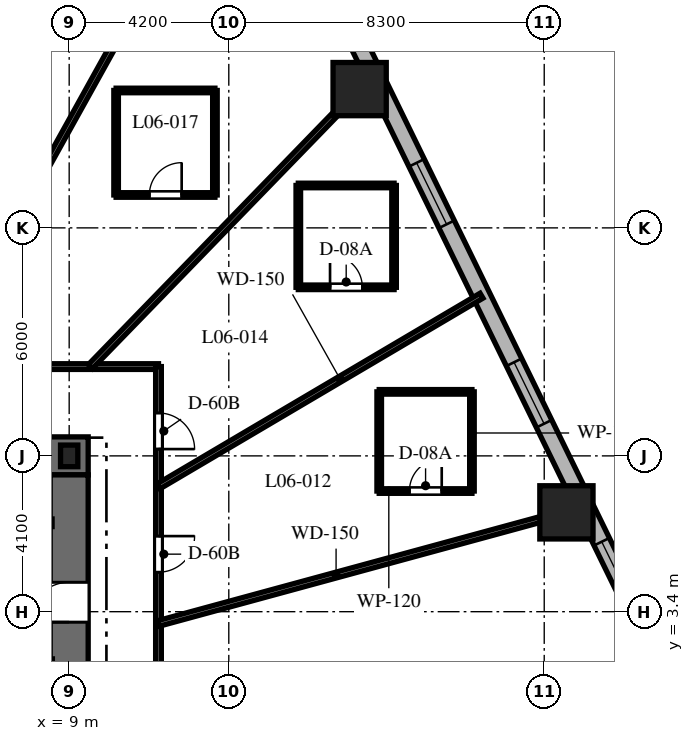
"""IFC4 building model, lengths in metres.
Left out: names, types, materials, properties, quantities, classifications, styles, units other than length and angle.
Written with IfcOpenShell. Run it as: python <this file> out.ifc"""

import sys

from ifc_helpers import new_model, si_unit, direction, frame, frame_2d, origin, origin_2d, place, context, subcontext, project, spatial, rectangle, i_section, extrude, element, fill, save


model = new_model("IFC4")
c1 = context("Model", 3, precision=1e-05, world=origin(), true_north=direction((0.0, 1.0)))
c2 = subcontext(c1, "Body", "Model", "MODEL_VIEW")
j1 = project(units=[si_unit("LENGTHUNIT", "METRE"), si_unit("PLANEANGLEUNIT", "RADIAN")], contexts=[c1])
p1 = place(None, origin())
s1 = spatial("IfcSite", under=j1, at=p1, CompositionType="ELEMENT")
p2 = place(p1, origin())
s2 = spatial("IfcBuilding", under=s1, at=p2, CompositionType="ELEMENT")
p3 = place(p2, frame((0.0, 0.0, 34.2)))
s3 = spatial("IfcBuildingStorey", under=s2, at=p3, CompositionType="ELEMENT", Elevation=34.2)
p4 = place(p3, frame((1.85, 7.5, 0.0), z_axis=(0.0, 0.0, 1.0), x_axis=(1.0, 0.0, 0.0)))
e1 = element("IfcWall", 1, at=p4, inside=s3, PredefinedType="SHEAR", context=c2, shape_type="SweptSolid", body=[
    extrude(rectangle(XDim=7.65, YDim=1.0, at=frame_2d((3.825, 0.0))), origin(), (0.0, 0.0, 1.0), 3.7),
])
p5 = place(p3, frame((9.0, -7.0, 0.0), z_axis=(0.0, 0.0, 1.0), x_axis=(0.0, 1.0, 0.0)))
e2 = element("IfcWall", 2, at=p5, inside=s3, PredefinedType="SHEAR", context=c2, shape_type="SweptSolid", body=[
    extrude(rectangle(XDim=14.0, YDim=1.0, at=frame_2d((7.0, 0.0))), origin(), (0.0, 0.0, 1.0), 3.7),
])
p6 = place(p5, frame((10.125, 0.0, 0.0)))
e3 = element("IfcOpeningElement", 3, at=p6, cuts=e2, PredefinedType="OPENING", context=c2, shape_type="SweptSolid", body=[
    extrude(rectangle(XDim=1.05, YDim=2.15, at=frame_2d((0.525, 1.075))), frame((0.0, 0.51, 0.0), z_axis=(0.0, -1.0, 0.0), x_axis=(1.0, 0.0, 0.0)), (0.0, 0.0, 1.0), 1.02),
])
p7 = place(p3, frame((8.458, -6.985, 0.0), z_axis=(0.0, 0.0, 1.0), x_axis=(0.0, 1.0, 0.0)))
e4 = element("IfcWall", 4, at=p7, inside=s3, PredefinedType="SHEAR", context=c2, shape_type="SweptSolid", body=[
    extrude(rectangle(XDim=9.143, YDim=0.2, at=frame_2d((4.572, 0.0))), origin(), (0.0, 0.0, 1.0), 3.7),
])
p8 = place(p3, frame((9.0, 7.5, 0.0), z_axis=(0.0, 0.0, 1.0), x_axis=(1.0, 0.0, 0.0)))
e5 = element("IfcColumn", 5, at=p8, inside=s3, PredefinedType="COLUMN", context=c2, shape_type="SweptSolid", body=[
    extrude(i_section(OverallWidth=0.454, OverallDepth=0.569, WebThickness=0.078, FlangeThickness=0.125, at=origin_2d()), origin(), (0.0, 0.0, 1.0), 3.7),
])
for number, where, z_axis, x_axis in (
    (6, (22.084, 6.014, 0.0), (0.0, 0.0, 1.0), (1.0, 0.0, 0.0)),
    (7, (16.643, 17.152, 0.0), (0.0, 0.0, 1.0), (1.0, 0.0, 0.0)),
):
    element("IfcColumn", number, at=place(p3, frame(where, z_axis=z_axis, x_axis=x_axis)), inside=s3, PredefinedType="COLUMN", context=c2, shape_type="SweptSolid", body=[
        extrude(rectangle(XDim=1.4, YDim=1.4, at=origin_2d()), origin(), (0.0, 0.0, 1.0), 3.7),
    ])
p9 = place(p3, frame((24.336, 2.532, 0.0), z_axis=(0.0, 0.0, 1.0), x_axis=(-0.438931326393, 0.898520612291, 0.0)))
e8 = element("IfcWall", 8, at=p9, inside=s3, PredefinedType="SOLIDWALL", context=c2, shape_type="SweptSolid", body=[
    extrude(rectangle(XDim=20.623, YDim=0.45, at=frame_2d((10.312, 0.0))), origin(), (0.0, 0.0, 1.0), 3.4),
])
p10 = place(p9, frame((6.47, 0.0, 0.8)))
e9 = element("IfcOpeningElement", 9, at=p10, cuts=e8, PredefinedType="OPENING", context=c2, shape_type="SweptSolid", body=[
    extrude(rectangle(XDim=1.8, YDim=1.8, at=frame_2d((0.9, 0.9))), frame((0.0, 0.235, 0.0), z_axis=(0.0, -1.0, 0.0), x_axis=(1.0, 0.0, 0.0)), (0.0, 0.0, 1.0), 0.47),
])
p11 = place(p9, frame((12.311, 0.0, 0.8)))
e10 = element("IfcOpeningElement", 10, at=p11, cuts=e8, PredefinedType="OPENING", context=c2, shape_type="SweptSolid", body=[
    extrude(rectangle(XDim=1.8, YDim=1.8, at=frame_2d((0.9, 0.9))), frame((0.0, 0.235, 0.0), z_axis=(0.0, -1.0, 0.0), x_axis=(1.0, 0.0, 0.0)), (0.0, 0.0, 1.0), 0.47),
])
p12 = place(p9, frame((17.66, 0.0, 0.8)))
e11 = element("IfcOpeningElement", 11, at=p12, cuts=e8, PredefinedType="OPENING", context=c2, shape_type="SweptSolid", body=[
    extrude(rectangle(XDim=1.8, YDim=1.8, at=frame_2d((0.9, 0.9))), frame((0.0, 0.235, 0.0), z_axis=(0.0, -1.0, 0.0), x_axis=(1.0, 0.0, 0.0)), (0.0, 0.0, 1.0), 0.47),
])
p13 = place(p9, frame((1.214, 0.0, 0.8)))
e12 = element("IfcOpeningElement", 12, at=p13, cuts=e8, PredefinedType="OPENING", context=c2, shape_type="SweptSolid", body=[
    extrude(rectangle(XDim=1.8, YDim=1.8, at=frame_2d((0.9, 0.9))), frame((0.0, 0.235, 0.0), z_axis=(0.0, -1.0, 0.0), x_axis=(1.0, 0.0, 0.0)), (0.0, 0.0, 1.0), 0.47),
])
p14 = place(p3, frame((-11.35, 9.85, 0.0), z_axis=(0.0, 0.0, 1.0), x_axis=(1.0, 0.0, 0.0)))
e13 = element("IfcWall", 13, at=p14, inside=s3, PredefinedType="PARTITIONING", context=c2, shape_type="SweptSolid", body=[
    extrude(rectangle(XDim=22.7, YDim=0.15, at=frame_2d((11.35, 0.0))), origin(), (0.0, 0.0, 1.0), 2.84),
])
p15 = place(p14, frame((18.436, 0.0, 0.0)))
e14 = element("IfcOpeningElement", 14, at=p15, cuts=e13, PredefinedType="OPENING", context=c2, shape_type="SweptSolid", body=[
    extrude(rectangle(XDim=0.95, YDim=2.03, at=frame_2d((0.475, 1.015))), frame((0.0, 0.085, 0.0), z_axis=(0.0, -1.0, 0.0), x_axis=(1.0, 0.0, 0.0)), (0.0, 0.0, 1.0), 0.17),
])
p16 = place(p14, frame((15.176, 0.0, 0.0)))
e15 = element("IfcOpeningElement", 15, at=p16, cuts=e13, PredefinedType="OPENING", context=c2, shape_type="SweptSolid", body=[
    extrude(rectangle(XDim=0.9, YDim=2.03, at=frame_2d((0.45, 1.015))), frame((0.0, 0.085, 0.0), z_axis=(0.0, -1.0, 0.0), x_axis=(1.0, 0.0, 0.0)), (0.0, 0.0, 1.0), 0.17),
])
p17 = place(p14, frame((12.415, 0.0, 0.0)))
e16 = element("IfcOpeningElement", 16, at=p17, cuts=e13, PredefinedType="OPENING", context=c2, shape_type="SweptSolid", body=[
    extrude(rectangle(XDim=0.95, YDim=2.03, at=frame_2d((0.475, 1.015))), frame((0.0, 0.085, 0.0), z_axis=(0.0, -1.0, 0.0), x_axis=(1.0, 0.0, 0.0)), (0.0, 0.0, 1.0), 0.17),
])
p18 = place(p14, frame((8.925, 0.0, 0.0)))
e17 = element("IfcOpeningElement", 17, at=p18, cuts=e13, PredefinedType="OPENING", context=c2, shape_type="SweptSolid", body=[
    extrude(rectangle(XDim=0.95, YDim=2.03, at=frame_2d((0.475, 1.015))), frame((0.0, 0.085, 0.0), z_axis=(0.0, -1.0, 0.0), x_axis=(1.0, 0.0, 0.0)), (0.0, 0.0, 1.0), 0.17),
])
p19 = place(p14, frame((3.369, 0.0, 0.0)))
e18 = element("IfcOpeningElement", 18, at=p19, cuts=e13, PredefinedType="OPENING", context=c2, shape_type="SweptSolid", body=[
    extrude(rectangle(XDim=0.95, YDim=2.03, at=frame_2d((0.475, 1.015))), frame((0.0, 0.085, 0.0), z_axis=(0.0, -1.0, 0.0), x_axis=(1.0, 0.0, 0.0)), (0.0, 0.0, 1.0), 0.17),
])
p20 = place(p3, frame((11.35, 9.85, 0.0), z_axis=(0.0, 0.0, 1.0), x_axis=(0.0, -1.0, 0.0)))
e19 = element("IfcWall", 19, at=p20, inside=s3, PredefinedType="PARTITIONING", context=c2, shape_type="SweptSolid", body=[
    extrude(rectangle(XDim=19.7, YDim=0.15, at=frame_2d((9.85, 0.0))), origin(), (0.0, 0.0, 1.0), 2.84),
])
p21 = place(p20, frame((4.461, 0.0, 0.0)))
e20 = element("IfcOpeningElement", 20, at=p21, cuts=e19, PredefinedType="OPENING", context=c2, shape_type="SweptSolid", body=[
    extrude(rectangle(XDim=0.95, YDim=2.03, at=frame_2d((0.475, 1.015))), frame((0.0, 0.085, 0.0), z_axis=(0.0, -1.0, 0.0), x_axis=(1.0, 0.0, 0.0)), (0.0, 0.0, 1.0), 0.17),
])
p22 = place(p20, frame((1.221, 0.0, 0.0)))
e21 = element("IfcOpeningElement", 21, at=p22, cuts=e19, PredefinedType="OPENING", context=c2, shape_type="SweptSolid", body=[
    extrude(rectangle(XDim=0.95, YDim=2.03, at=frame_2d((0.475, 1.015))), frame((0.0, 0.085, 0.0), z_axis=(0.0, -1.0, 0.0), x_axis=(1.0, 0.0, 0.0)), (0.0, 0.0, 1.0), 0.17),
])
p23 = place(p20, frame((16.714, 0.0, 0.0)))
e22 = element("IfcOpeningElement", 22, at=p23, cuts=e19, PredefinedType="OPENING", context=c2, shape_type="SweptSolid", body=[
    extrude(rectangle(XDim=0.95, YDim=2.03, at=frame_2d((0.475, 1.015))), frame((0.0, 0.085, 0.0), z_axis=(0.0, -1.0, 0.0), x_axis=(1.0, 0.0, 0.0)), (0.0, 0.0, 1.0), 0.17),
])
p24 = place(p20, frame((12.932, 0.0, 0.0)))
e23 = element("IfcOpeningElement", 23, at=p24, cuts=e19, PredefinedType="OPENING", context=c2, shape_type="SweptSolid", body=[
    extrude(rectangle(XDim=0.95, YDim=2.03, at=frame_2d((0.475, 1.015))), frame((0.0, 0.085, 0.0), z_axis=(0.0, -1.0, 0.0), x_axis=(1.0, 0.0, 0.0)), (0.0, 0.0, 1.0), 0.17),
])
p25 = place(p20, frame((8.838, 0.0, 0.0)))
e24 = element("IfcOpeningElement", 24, at=p25, cuts=e19, PredefinedType="OPENING", context=c2, shape_type="SweptSolid", body=[
    extrude(rectangle(XDim=0.95, YDim=2.03, at=frame_2d((0.475, 1.015))), frame((0.0, 0.085, 0.0), z_axis=(0.0, -1.0, 0.0), x_axis=(1.0, 0.0, 0.0)), (0.0, 0.0, 1.0), 0.17),
])
p26 = place(p3, frame((11.35, 3.091, 0.0), z_axis=(0.0, 0.0, 1.0), x_axis=(0.964859685283, 0.262765651704, 0.0)))
e25 = element("IfcWall", 25, at=p26, inside=s3, PredefinedType="PARTITIONING", context=c2, shape_type="SweptSolid", body=[
    extrude(rectangle(XDim=11.629, YDim=0.15, at=frame_2d((5.814, 0.0))), origin(), (0.0, 0.0, 1.0), 2.54),
])
p27 = place(p3, frame((11.35, 6.698, 0.0), z_axis=(0.0, 0.0, 1.0), x_axis=(0.861198232886, 0.508269223614, 0.0)))
e26 = element("IfcWall", 26, at=p27, inside=s3, PredefinedType="PARTITIONING", context=c2, shape_type="SweptSolid", body=[
    extrude(rectangle(XDim=9.87, YDim=0.15, at=frame_2d((4.935, 0.0))), origin(), (0.0, 0.0, 1.0), 2.54),
])
p28 = place(p3, frame((9.558, 9.85, 0.0), z_axis=(0.0, 0.0, 1.0), x_axis=(0.69638346089, 0.717669893056, 0.0)))
e27 = element("IfcWall", 27, at=p28, inside=s3, PredefinedType="PARTITIONING", context=c2, shape_type="SweptSolid", body=[
    extrude(rectangle(XDim=10.701, YDim=0.15, at=frame_2d((5.351, 0.0))), origin(), (0.0, 0.0, 1.0), 2.54),
])
p29 = place(p3, frame((5.471, 9.85, 0.0), z_axis=(0.0, 0.0, 1.0), x_axis=(0.48553323157, 0.874218211341, 0.0)))
e28 = element("IfcWall", 28, at=p29, inside=s3, PredefinedType="PARTITIONING", context=c2, shape_type="SweptSolid", body=[
    extrude(rectangle(XDim=14.74, YDim=0.15, at=frame_2d((7.37, 0.0))), origin(), (0.0, 0.0, 1.0), 2.54),
])
p30 = place(p3, frame((17.158, 6.575, 0.0), z_axis=(0.0, 0.0, 1.0), x_axis=(1.0, 0.0, 0.0)))
e29 = element("IfcWall", 29, at=p30, inside=s3, PredefinedType="PARTITIONING", context=c2, shape_type="SweptSolid", body=[
    extrude(rectangle(XDim=2.44, YDim=0.12, at=frame_2d((1.22, 0.0))), origin(), (0.0, 0.0, 1.0), 2.84),
])
p31 = place(p30, frame((0.795, 0.0, 0.0)))
e30 = element("IfcOpeningElement", 30, at=p31, cuts=e29, PredefinedType="OPENING", context=c2, shape_type="SweptSolid", body=[
    extrude(rectangle(XDim=0.85, YDim=2.03, at=frame_2d((0.425, 1.015))), frame((0.0, 0.07, 0.0), z_axis=(0.0, -1.0, 0.0), x_axis=(1.0, 0.0, 0.0)), (0.0, 0.0, 1.0), 0.14),
])
p32 = place(p3, frame((19.598, 6.575, 0.0), z_axis=(0.0, 0.0, 1.0), x_axis=(0.0, 1.0, 0.0)))
e31 = element("IfcWall", 31, at=p32, inside=s3, PredefinedType="PARTITIONING", context=c2, shape_type="SweptSolid", body=[
    extrude(rectangle(XDim=2.61, YDim=0.12, at=frame_2d((1.305, 0.0))), origin(), (0.0, 0.0, 1.0), 3.4),
])
p33 = place(p3, frame((19.598, 9.185, 0.0), z_axis=(0.0, 0.0, 1.0), x_axis=(-1.0, 0.0, 0.0)))
e32 = element("IfcWall", 32, at=p33, inside=s3, PredefinedType="PARTITIONING", context=c2, shape_type="SweptSolid", body=[
    extrude(rectangle(XDim=2.44, YDim=0.12, at=frame_2d((1.22, 0.0))), origin(), (0.0, 0.0, 1.0), 3.4),
])
p34 = place(p3, frame((17.158, 9.185, 0.0), z_axis=(0.0, 0.0, 1.0), x_axis=(0.0, -1.0, 0.0)))
e33 = element("IfcWall", 33, at=p34, inside=s3, PredefinedType="PARTITIONING", context=c2, shape_type="SweptSolid", body=[
    extrude(rectangle(XDim=2.61, YDim=0.12, at=frame_2d((1.305, 0.0))), origin(), (0.0, 0.0, 1.0), 2.84),
])
p35 = place(p3, frame((15.029, 11.936, 0.0), z_axis=(0.0, 0.0, 1.0), x_axis=(1.0, 0.0, 0.0)))
e34 = element("IfcWall", 34, at=p35, inside=s3, PredefinedType="PARTITIONING", context=c2, shape_type="SweptSolid", body=[
    extrude(rectangle(XDim=2.52, YDim=0.12, at=frame_2d((1.26, 0.0))), origin(), (0.0, 0.0, 1.0), 2.927),
])
p36 = place(p35, frame((0.835, 0.0, 0.0)))
e35 = element("IfcOpeningElement", 35, at=p36, cuts=e34, PredefinedType="OPENING", context=c2, shape_type="SweptSolid", body=[
    extrude(rectangle(XDim=0.85, YDim=2.03, at=frame_2d((0.425, 1.015))), frame((0.0, 0.07, 0.0), z_axis=(0.0, -1.0, 0.0), x_axis=(1.0, 0.0, 0.0)), (0.0, 0.0, 1.0), 0.14),
])
p37 = place(p3, frame((17.549, 11.936, 0.0), z_axis=(0.0, 0.0, 1.0), x_axis=(0.0, 1.0, 0.0)))
e36 = element("IfcWall", 36, at=p37, inside=s3, PredefinedType="PARTITIONING", context=c2, shape_type="SweptSolid", body=[
    extrude(rectangle(XDim=2.68, YDim=0.12, at=frame_2d((1.34, 0.0))), origin(), (0.0, 0.0, 1.0), 3.4),
])
p38 = place(p3, frame((17.549, 14.616, 0.0), z_axis=(0.0, 0.0, 1.0), x_axis=(-1.0, 0.0, 0.0)))
e37 = element("IfcWall", 37, at=p38, inside=s3, PredefinedType="PARTITIONING", context=c2, shape_type="SweptSolid", body=[
    extrude(rectangle(XDim=2.52, YDim=0.12, at=frame_2d((1.26, 0.0))), origin(), (0.0, 0.0, 1.0), 3.4),
])
p39 = place(p3, frame((15.029, 14.616, 0.0), z_axis=(0.0, 0.0, 1.0), x_axis=(0.0, -1.0, 0.0)))
e38 = element("IfcWall", 38, at=p39, inside=s3, PredefinedType="PARTITIONING", context=c2, shape_type="SweptSolid", body=[
    extrude(rectangle(XDim=2.68, YDim=0.12, at=frame_2d((1.34, 0.0))), origin(), (0.0, 0.0, 1.0), 2.927),
])
p40 = place(p3, frame((10.235, 14.366, 0.0), z_axis=(0.0, 0.0, 1.0), x_axis=(1.0, 0.0, 0.0)))
e39 = element("IfcWall", 39, at=p40, inside=s3, PredefinedType="PARTITIONING", context=c2, shape_type="SweptSolid", body=[
    extrude(rectangle(XDim=2.6, YDim=0.12, at=frame_2d((1.3, 0.0))), origin(), (0.0, 0.0, 1.0), 3.4),
])
p41 = place(p40, frame((0.875, 0.0, 0.0)))
e40 = element("IfcOpeningElement", 40, at=p41, cuts=e39, PredefinedType="OPENING", context=c2, shape_type="SweptSolid", body=[
    extrude(rectangle(XDim=0.85, YDim=2.03, at=frame_2d((0.425, 1.015))), frame((0.0, 0.07, 0.0), z_axis=(0.0, -1.0, 0.0), x_axis=(1.0, 0.0, 0.0)), (0.0, 0.0, 1.0), 0.14),
])
p42 = place(p3, frame((12.835, 14.366, 0.0), z_axis=(0.0, 0.0, 1.0), x_axis=(0.0, 1.0, 0.0)))
e41 = element("IfcWall", 41, at=p42, inside=s3, PredefinedType="PARTITIONING", context=c2, shape_type="SweptSolid", body=[
    extrude(rectangle(XDim=2.75, YDim=0.12, at=frame_2d((1.375, 0.0))), origin(), (0.0, 0.0, 1.0), 2.972),
])
p43 = place(p3, frame((12.835, 17.116, 0.0), z_axis=(0.0, 0.0, 1.0), x_axis=(-1.0, 0.0, 0.0)))
e42 = element("IfcWall", 42, at=p43, inside=s3, PredefinedType="PARTITIONING", context=c2, shape_type="SweptSolid", body=[
    extrude(rectangle(XDim=2.6, YDim=0.12, at=frame_2d((1.3, 0.0))), origin(), (0.0, 0.0, 1.0), 3.4),
])
p44 = place(p3, frame((10.235, 17.116, 0.0), z_axis=(0.0, 0.0, 1.0), x_axis=(0.0, -1.0, 0.0)))
e43 = element("IfcWall", 43, at=p44, inside=s3, PredefinedType="PARTITIONING", context=c2, shape_type="SweptSolid", body=[
    extrude(rectangle(XDim=2.75, YDim=0.12, at=frame_2d((1.375, 0.0))), origin(), (0.0, 0.0, 1.0), 2.972),
])
p45 = place(p10, origin())
e44 = element("IfcWindow", 44, at=p45, inside=s3, PartitioningType="SINGLE_PANEL", PredefinedType="WINDOW", context=c2, shape_type="SweptSolid", body=[
    extrude(rectangle(XDim=1.8, YDim=1.8, at=frame_2d((0.9, 0.9))), frame((0.0, 0.03, 0.0), z_axis=(0.0, -1.0, 0.0), x_axis=(1.0, 0.0, 0.0)), (0.0, 0.0, 1.0), 0.06),
])
fill(e9, e44)
p46 = place(p11, origin())
e45 = element("IfcWindow", 45, at=p46, inside=s3, PartitioningType="SINGLE_PANEL", PredefinedType="WINDOW", context=c2, shape_type="SweptSolid", body=[
    extrude(rectangle(XDim=1.8, YDim=1.8, at=frame_2d((0.9, 0.9))), frame((0.0, 0.03, 0.0), z_axis=(0.0, -1.0, 0.0), x_axis=(1.0, 0.0, 0.0)), (0.0, 0.0, 1.0), 0.06),
])
fill(e10, e45)
p47 = place(p13, origin())
e46 = element("IfcWindow", 46, at=p47, inside=s3, PartitioningType="SINGLE_PANEL", PredefinedType="WINDOW", context=c2, shape_type="SweptSolid", body=[
    extrude(rectangle(XDim=1.8, YDim=1.8, at=frame_2d((0.9, 0.9))), frame((0.0, 0.03, 0.0), z_axis=(0.0, -1.0, 0.0), x_axis=(1.0, 0.0, 0.0)), (0.0, 0.0, 1.0), 0.06),
])
fill(e12, e46)
p48 = place(p6, origin())
e47 = element("IfcDoor", 47, at=p48, inside=s3, OperationType="SINGLE_SWING_LEFT", PredefinedType="DOOR", context=c2, shape_type="SweptSolid", body=[
    extrude(rectangle(XDim=1.05, YDim=2.15, at=frame_2d((0.525, 1.075))), frame((0.0, 0.025, 0.0), z_axis=(0.0, -1.0, 0.0), x_axis=(1.0, 0.0, 0.0)), (0.0, 0.0, 1.0), 0.05),
])
fill(e3, e47)
p49 = place(p21, origin())
e48 = element("IfcDoor", 48, at=p49, inside=s3, OperationType="SINGLE_SWING_LEFT", PredefinedType="DOOR", context=c2, shape_type="SweptSolid", body=[
    extrude(rectangle(XDim=0.95, YDim=2.03, at=frame_2d((0.475, 1.015))), frame((0.0, 0.025, 0.0), z_axis=(0.0, -1.0, 0.0), x_axis=(1.0, 0.0, 0.0)), (0.0, 0.0, 1.0), 0.05),
])
fill(e20, e48)
p50 = place(p31, origin())
e49 = element("IfcDoor", 49, at=p50, inside=s3, OperationType="SINGLE_SWING_RIGHT", PredefinedType="DOOR", context=c2, shape_type="SweptSolid", body=[
    extrude(rectangle(XDim=0.85, YDim=2.03, at=frame_2d((0.425, 1.015))), frame((0.0, 0.025, 0.0), z_axis=(0.0, -1.0, 0.0), x_axis=(1.0, 0.0, 0.0)), (0.0, 0.0, 1.0), 0.05),
])
fill(e30, e49)
p51 = place(p22, origin())
e50 = element("IfcDoor", 50, at=p51, inside=s3, OperationType="SINGLE_SWING_RIGHT", PredefinedType="DOOR", context=c2, shape_type="SweptSolid", body=[
    extrude(rectangle(XDim=0.95, YDim=2.03, at=frame_2d((0.475, 1.015))), frame((0.0, 0.025, 0.0), z_axis=(0.0, -1.0, 0.0), x_axis=(1.0, 0.0, 0.0)), (0.0, 0.0, 1.0), 0.05),
])
fill(e21, e50)
p52 = place(p36, origin())
e51 = element("IfcDoor", 51, at=p52, inside=s3, OperationType="SINGLE_SWING_LEFT", PredefinedType="DOOR", context=c2, shape_type="SweptSolid", body=[
    extrude(rectangle(XDim=0.85, YDim=2.03, at=frame_2d((0.425, 1.015))), frame((0.0, 0.025, 0.0), z_axis=(0.0, -1.0, 0.0), x_axis=(1.0, 0.0, 0.0)), (0.0, 0.0, 1.0), 0.05),
])
fill(e35, e51)
p53 = place(p41, origin())
e52 = element("IfcDoor", 52, at=p53, inside=s3, OperationType="SINGLE_SWING_RIGHT", PredefinedType="DOOR", context=c2, shape_type="SweptSolid", body=[
    extrude(rectangle(XDim=0.85, YDim=2.03, at=frame_2d((0.425, 1.015))), frame((0.0, 0.025, 0.0), z_axis=(0.0, -1.0, 0.0), x_axis=(1.0, 0.0, 0.0)), (0.0, 0.0, 1.0), 0.05),
])
fill(e40, e52)
save(model, sys.argv[1])
